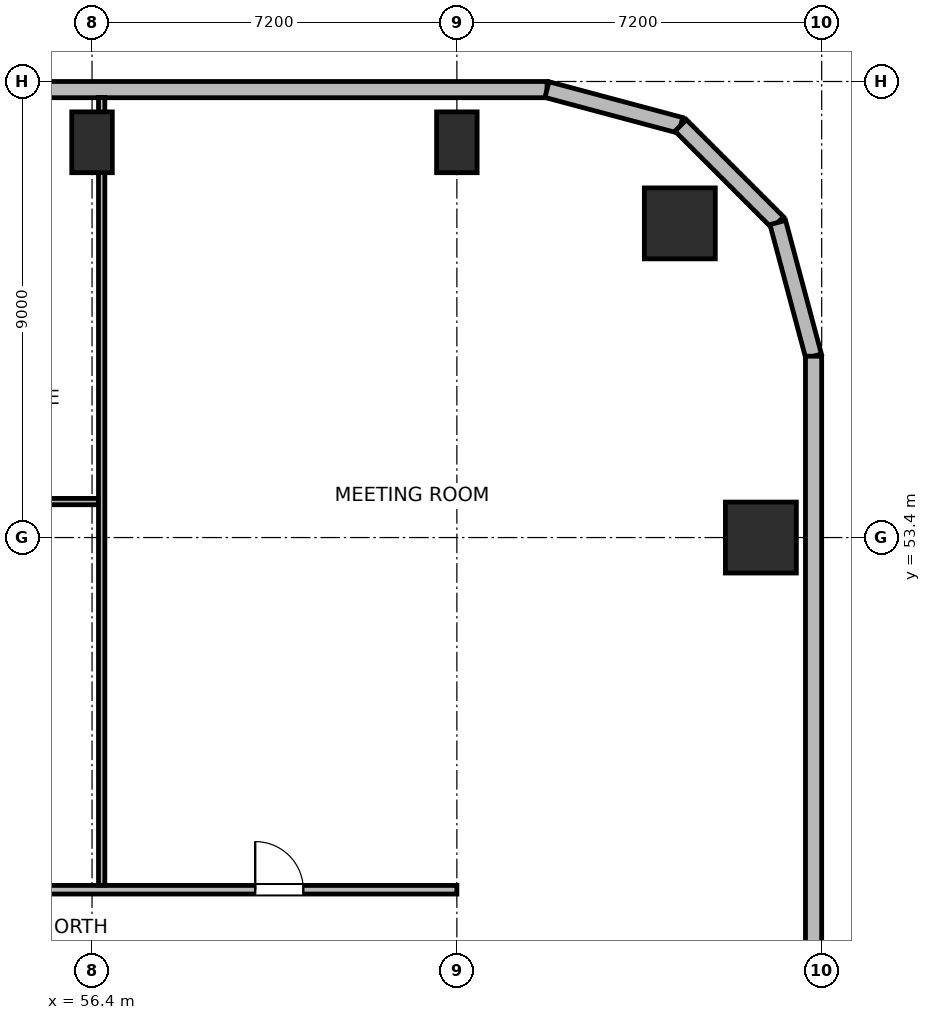
"""IFC4 building model, lengths in metres.
Left out: names, types, materials, properties, quantities, classifications, styles, units other than length and angle.
Written with IfcOpenShell. Run it as: python <this file> out.ifc"""

import sys

from ifc_helpers import new_model, si_unit, direction, frame, frame_2d, origin, origin_2d, place, context, subcontext, project, spatial, rectangle, circle, extrude, element, fill, save


model = new_model("IFC4")
c1 = context("Model", 3, precision=1e-05, world=origin(), true_north=direction((0.0, 1.0)))
c2 = subcontext(c1, "Body", "Model", "MODEL_VIEW")
j1 = project(units=[si_unit("LENGTHUNIT", "METRE"), si_unit("PLANEANGLEUNIT", "RADIAN")], contexts=[c1])
p1 = place(None, origin())
s1 = spatial("IfcSite", under=j1, at=p1, CompositionType="ELEMENT")
p2 = place(p1, origin())
s2 = spatial("IfcBuilding", under=s1, at=p2, CompositionType="ELEMENT")
p3 = place(p2, frame((0.0, 0.0, 133.8)))
s3 = spatial("IfcBuildingStorey", under=s2, at=p3, CompositionType="ELEMENT", Elevation=133.8)
p4 = place(p3, frame((68.0, 59.6, 0.0), z_axis=(0.0, 0.0, 1.0), x_axis=(1.0, 0.0, 0.0)))
e1 = element("IfcColumn", 1, at=p4, inside=s3, PredefinedType="COLUMN", context=c2, shape_type="SweptSolid", body=[
    extrude(circle(Radius=0.7, at=origin_2d()), origin(), (0.0, 0.0, 1.0), 3.9),
])
for number, where, z_axis, x_axis in (
    (2, (56.4, 61.2, 0.0), (0.0, 0.0, 1.0), (1.0, 0.0, 0.0)),
    (3, (63.6, 61.2, 0.0), (0.0, 0.0, 1.0), (1.0, 0.0, 0.0)),
):
    element("IfcColumn", number, at=place(p3, frame(where, z_axis=z_axis, x_axis=x_axis)), inside=s3, PredefinedType="COLUMN", context=c2, shape_type="SweptSolid", body=[
        extrude(rectangle(XDim=0.8, YDim=1.2, at=origin_2d()), origin(), (0.0, 0.0, 1.0), 3.9),
    ])
p5 = place(p3, frame((69.6, 53.4, 0.0), z_axis=(0.0, 0.0, 1.0), x_axis=(1.0, 0.0, 0.0)))
e4 = element("IfcColumn", 4, at=p5, inside=s3, PredefinedType="COLUMN", context=c2, shape_type="SweptSolid", body=[
    extrude(rectangle(XDim=1.4, YDim=1.4, at=origin_2d()), origin(), (0.0, 0.0, 1.0), 3.9),
])
p6 = place(p3, frame((54.645, 62.24, 0.0), z_axis=(0.0, 0.0, 1.0), x_axis=(1.0, 0.0, 0.0)))
e5 = element("IfcWall", 5, at=p6, inside=s3, PredefinedType="SOLIDWALL", context=c2, shape_type="SweptSolid", body=[
    extrude(rectangle(XDim=10.734, YDim=0.32, at=frame_2d((5.367, 0.0))), origin(), (0.0, 0.0, 1.0), 3.64),
])
p7 = place(p3, frame((65.379, 62.24, 0.0), z_axis=(0.0, 0.0, 1.0), x_axis=(0.965958423373, -0.25869736047, 0.0)))
e6 = element("IfcWall", 6, at=p7, inside=s3, PredefinedType="SOLIDWALL", context=c2, shape_type="SweptSolid", body=[
    extrude(rectangle(XDim=2.731, YDim=0.32, at=frame_2d((1.366, 0.0))), origin(), (0.0, 0.0, 1.0), 3.64),
])
p8 = place(p3, frame((68.017, 61.533, 0.0), z_axis=(0.0, 0.0, 1.0), x_axis=(0.707151821269, -0.707061738235, 0.0)))
e7 = element("IfcWall", 7, at=p8, inside=s3, PredefinedType="SOLIDWALL", context=c2, shape_type="SweptSolid", body=[
    extrude(rectangle(XDim=2.71, YDim=0.32, at=frame_2d((1.355, 0.0))), origin(), (0.0, 0.0, 1.0), 3.64),
])
p9 = place(p3, frame((69.934, 59.617, 0.0), z_axis=(0.0, 0.0, 1.0), x_axis=(0.258613949072, -0.965980758269, 0.0)))
e8 = element("IfcWall", 8, at=p9, inside=s3, PredefinedType="SOLIDWALL", context=c2, shape_type="SweptSolid", body=[
    extrude(rectangle(XDim=2.731, YDim=0.32, at=frame_2d((1.366, 0.0))), origin(), (0.0, 0.0, 1.0), 3.64),
])
p10 = place(p3, frame((70.64, 56.979, 0.0), z_axis=(0.0, 0.0, 1.0), x_axis=(0.0, -1.0, 0.0)))
e9 = element("IfcWall", 9, at=p10, inside=s3, PredefinedType="SOLIDWALL", context=c2, shape_type="SweptSolid", body=[
    extrude(rectangle(XDim=14.219, YDim=0.32, at=frame_2d((7.109, 0.0))), origin(), (0.0, 0.0, 1.0), 3.64),
])
p11 = place(p3, frame((30.35, 46.45, 0.0), z_axis=(0.0, 0.0, 1.0), x_axis=(1.0, 0.0, 0.0)))
e10 = element("IfcWall", 10, at=p11, inside=s3, PredefinedType="PARTITIONING", context=c2, shape_type="SweptSolid", body=[
    extrude(rectangle(XDim=33.25, YDim=0.17, at=frame_2d((16.625, 0.0))), origin(), (0.0, 0.0, 1.0), 3.64),
])
p12 = place(p11, frame((3.03, 0.0, 0.0)))
e11 = element("IfcOpeningElement", 11, at=p12, cuts=e10, PredefinedType="OPENING", context=c2, shape_type="SweptSolid", body=[
    extrude(rectangle(XDim=0.95, YDim=2.04, at=frame_2d((0.475, 1.02))), frame((0.0, 0.095, 0.0), z_axis=(0.0, -1.0, 0.0), x_axis=(1.0, 0.0, 0.0)), (0.0, 0.0, 1.0), 0.19),
])
p13 = place(p11, frame((10.09, 0.0, 0.0)))
e12 = element("IfcOpeningElement", 12, at=p13, cuts=e10, PredefinedType="OPENING", context=c2, shape_type="SweptSolid", body=[
    extrude(rectangle(XDim=0.95, YDim=2.04, at=frame_2d((0.475, 1.02))), frame((0.0, 0.095, 0.0), z_axis=(0.0, -1.0, 0.0), x_axis=(1.0, 0.0, 0.0)), (0.0, 0.0, 1.0), 0.19),
])
p14 = place(p11, frame((15.1, 0.0, 0.0)))
e13 = element("IfcOpeningElement", 13, at=p14, cuts=e10, PredefinedType="OPENING", context=c2, shape_type="SweptSolid", body=[
    extrude(rectangle(XDim=0.95, YDim=2.04, at=frame_2d((0.475, 1.02))), frame((0.0, 0.095, 0.0), z_axis=(0.0, -1.0, 0.0), x_axis=(1.0, 0.0, 0.0)), (0.0, 0.0, 1.0), 0.19),
])
p15 = place(p11, frame((21.16, 0.0, 0.0)))
e14 = element("IfcOpeningElement", 14, at=p15, cuts=e10, PredefinedType="OPENING", context=c2, shape_type="SweptSolid", body=[
    extrude(rectangle(XDim=0.95, YDim=2.04, at=frame_2d((0.475, 1.02))), frame((0.0, 0.095, 0.0), z_axis=(0.0, -1.0, 0.0), x_axis=(1.0, 0.0, 0.0)), (0.0, 0.0, 1.0), 0.19),
])
p16 = place(p11, frame((29.27, 0.0, 0.0)))
e15 = element("IfcOpeningElement", 15, at=p16, cuts=e10, PredefinedType="OPENING", context=c2, shape_type="SweptSolid", body=[
    extrude(rectangle(XDim=0.95, YDim=2.04, at=frame_2d((0.475, 1.02))), frame((0.0, 0.095, 0.0), z_axis=(0.0, -1.0, 0.0), x_axis=(1.0, 0.0, 0.0)), (0.0, 0.0, 1.0), 0.19),
])
p17 = place(p3, frame((47.38, 54.11, 0.0), z_axis=(0.0, 0.0, 1.0), x_axis=(1.0, 0.0, 0.0)))
e16 = element("IfcWall", 16, at=p17, inside=s3, PredefinedType="PARTITIONING", context=c2, shape_type="SweptSolid", body=[
    extrude(rectangle(XDim=9.21, YDim=0.125, at=frame_2d((4.605, 0.0))), origin(), (0.0, 0.0, 1.0), 3.64),
])
p18 = place(p17, frame((4.155, 0.0, 0.0)))
e17 = element("IfcOpeningElement", 17, at=p18, cuts=e16, PredefinedType="OPENING", context=c2, shape_type="SweptSolid", body=[
    extrude(rectangle(XDim=0.9, YDim=2.02, at=frame_2d((0.45, 1.01))), frame((0.0, 0.073, 0.0), z_axis=(0.0, -1.0, 0.0), x_axis=(1.0, 0.0, 0.0)), (0.0, 0.0, 1.0), 0.145),
])
p19 = place(p3, frame((56.59, 46.537, 0.0), z_axis=(0.0, 0.0, 1.0), x_axis=(0.0, 1.0, 0.0)))
e18 = element("IfcWall", 18, at=p19, inside=s3, PredefinedType="PARTITIONING", context=c2, shape_type="SweptSolid", body=[
    extrude(rectangle(XDim=15.548, YDim=0.125, at=frame_2d((7.774, 0.0))), origin(), (0.0, 0.0, 1.0), 3.003),
])
p20 = place(p16, origin())
e19 = element("IfcDoor", 19, at=p20, inside=s3, OperationType="SINGLE_SWING_LEFT", PredefinedType="DOOR", context=c2, shape_type="SweptSolid", body=[
    extrude(rectangle(XDim=0.95, YDim=2.04, at=frame_2d((0.475, 1.02))), frame((0.0, 0.025, 0.0), z_axis=(0.0, -1.0, 0.0), x_axis=(1.0, 0.0, 0.0)), (0.0, 0.0, 1.0), 0.05),
])
fill(e15, e19)
save(model, sys.argv[1])
